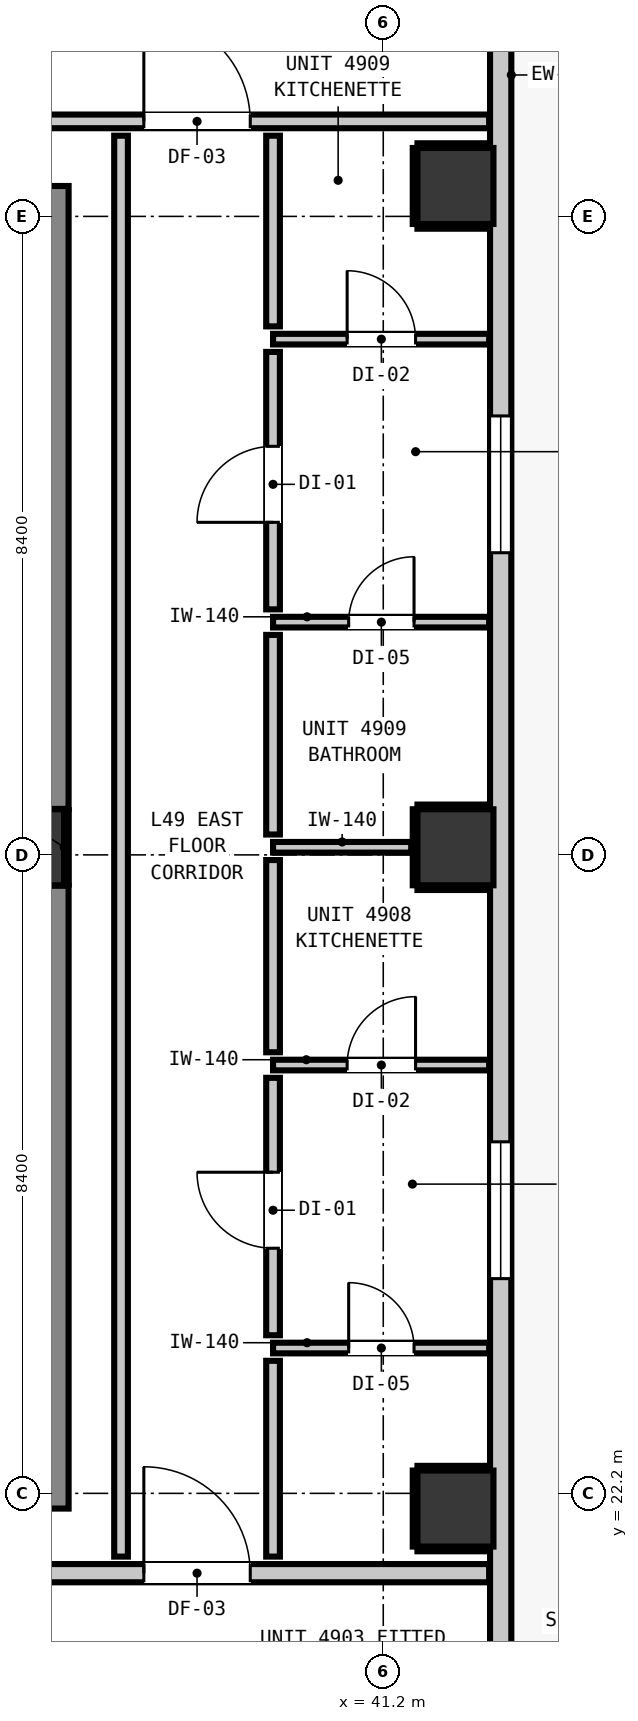
"""IFC4 building model, lengths in metres.
Left out: names, types, materials, properties, quantities, classifications, styles, units other than length and angle.
Written with IfcOpenShell. Run it as: python <this file> out.ifc"""

import sys

from ifc_helpers import new_model, si_unit, direction, frame, frame_2d, origin, origin_2d, place, context, subcontext, project, spatial, rectangle, extrude, element, fill, save


model = new_model("IFC4")
c1 = context("Model", 3, precision=1e-05, world=origin(), true_north=direction((0.0, 1.0)))
c2 = subcontext(c1, "Body", "Model", "MODEL_VIEW")
j1 = project(units=[si_unit("LENGTHUNIT", "METRE"), si_unit("PLANEANGLEUNIT", "RADIAN")], contexts=[c1])
p1 = place(None, origin())
s1 = spatial("IfcSite", under=j1, at=p1, CompositionType="ELEMENT")
p2 = place(p1, origin())
s2 = spatial("IfcBuilding", under=s1, at=p2, CompositionType="ELEMENT")
p3 = place(p2, frame((0.0, 0.0, 169.16)))
s3 = spatial("IfcBuildingStorey", under=s2, at=p3, CompositionType="ELEMENT", Elevation=169.16)
p4 = place(p3, frame((36.5, 30.7, 0.0), z_axis=(0.0, 0.0, 1.0), x_axis=(1.0, 0.0, 0.0)))
e1 = element("IfcColumn", 1, at=p4, inside=s3, PredefinedType="COLUMN", context=c2, shape_type="SweptSolid", body=[
    extrude(rectangle(XDim=1.0, YDim=1.0, at=origin_2d()), origin(), (0.0, 0.0, 1.0), 3.32),
])
p5 = place(p3, frame((36.56, 22.0, 0.0), z_axis=(0.0, 0.0, 1.0), x_axis=(0.0, 1.0, 0.0)))
e2 = element("IfcWall", 2, at=p5, inside=s3, PredefinedType="SHEAR", context=c2, shape_type="SweptSolid", body=[
    extrude(rectangle(XDim=8.195, YDim=1.0, at=frame_2d((4.098, 0.0))), origin(), (0.0, 0.0, 1.0), 3.32),
])
p6 = place(p3, frame((36.56, 31.205, 0.0), z_axis=(0.0, 0.0, 1.0), x_axis=(0.0, 1.0, 0.0)))
e3 = element("IfcWall", 3, at=p6, inside=s3, PredefinedType="SHEAR", context=c2, shape_type="SweptSolid", body=[
    extrude(rectangle(XDim=8.195, YDim=1.0, at=frame_2d((4.097, 0.0))), origin(), (0.0, 0.0, 1.0), 3.32),
])
for number, where, z_axis, x_axis in (
    (4, (42.15, 22.0, 0.0), (0.0, 0.0, 1.0), (1.0, 0.0, 0.0)),
    (5, (42.15, 30.7, 0.0), (0.0, 0.0, 1.0), (1.0, 0.0, 0.0)),
    (6, (42.15, 39.4, 0.0), (0.0, 0.0, 1.0), (1.0, 0.0, 0.0)),
):
    element("IfcColumn", number, at=place(p3, frame(where, z_axis=z_axis, x_axis=x_axis)), inside=s3, PredefinedType="COLUMN", context=c2, shape_type="SweptSolid", body=[
        extrude(rectangle(XDim=1.0, YDim=1.0, at=origin_2d()), origin(), (0.0, 0.0, 1.0), 3.32),
    ])
p7 = place(p3, frame((42.745, 49.845, 0.0), z_axis=(0.0, 0.0, 1.0), x_axis=(0.0, -1.0, 0.0)))
e7 = element("IfcWall", 7, at=p7, inside=s3, PredefinedType="STANDARD", context=c2, shape_type="SweptSolid", body=[
    extrude(rectangle(XDim=32.29, YDim=0.28, at=frame_2d((16.145, 0.0))), origin(), (0.0, 0.0, 1.0), 2.96),
])
p8 = place(p7, frame((0.904, 0.0, 0.0)))
e8 = element("IfcOpeningElement", 8, at=p8, cuts=e7, PredefinedType="OPENING", context=c2, shape_type="SweptSolid", body=[
    extrude(rectangle(XDim=1.0, YDim=2.15, at=frame_2d((0.5, 1.075))), frame((0.0, 0.15, 0.0), z_axis=(0.0, -1.0, 0.0), x_axis=(1.0, 0.0, 0.0)), (0.0, 0.0, 1.0), 0.3),
])
p9 = place(p7, frame((2.699, 0.0, 0.85)))
e9 = element("IfcOpeningElement", 9, at=p9, cuts=e7, PredefinedType="OPENING", context=c2, shape_type="SweptSolid", body=[
    extrude(rectangle(XDim=1.8, YDim=1.9, at=frame_2d((0.9, 0.95))), frame((0.0, 0.15, 0.0), z_axis=(0.0, -1.0, 0.0), x_axis=(1.0, 0.0, 0.0)), (0.0, 0.0, 1.0), 0.3),
])
p10 = place(p7, frame((23.02, 0.0, 0.85)))
e10 = element("IfcOpeningElement", 10, at=p10, cuts=e7, PredefinedType="OPENING", context=c2, shape_type="SweptSolid", body=[
    extrude(rectangle(XDim=1.8, YDim=1.9, at=frame_2d((0.9, 0.95))), frame((0.0, 0.15, 0.0), z_axis=(0.0, -1.0, 0.0), x_axis=(1.0, 0.0, 0.0)), (0.0, 0.0, 1.0), 0.3),
])
p11 = place(p7, frame((13.47, 0.0, 0.85)))
e11 = element("IfcOpeningElement", 11, at=p11, cuts=e7, PredefinedType="OPENING", context=c2, shape_type="SweptSolid", body=[
    extrude(rectangle(XDim=1.8, YDim=1.9, at=frame_2d((0.9, 0.95))), frame((0.0, 0.15, 0.0), z_axis=(0.0, -1.0, 0.0), x_axis=(1.0, 0.0, 0.0)), (0.0, 0.0, 1.0), 0.3),
])
p12 = place(p3, frame((12.983, 21.15, 0.0), z_axis=(0.0, 0.0, 1.0), x_axis=(1.0, 0.0, 0.0)))
e12 = element("IfcWall", 12, at=p12, inside=s3, PredefinedType="PARTITIONING", context=c2, shape_type="SweptSolid", body=[
    extrude(rectangle(XDim=29.61, YDim=0.24, at=frame_2d((14.805, 0.0))), origin(), (0.0, 0.0, 1.0), 2.96),
])
p13 = place(p12, frame((5.227, 0.0, 0.0)))
e13 = element("IfcOpeningElement", 13, at=p13, cuts=e12, PredefinedType="OPENING", context=c2, shape_type="SweptSolid", body=[
    extrude(rectangle(XDim=1.1, YDim=2.15, at=frame_2d((0.55, 1.075))), frame((0.0, 0.13, 0.0), z_axis=(0.0, -1.0, 0.0), x_axis=(1.0, 0.0, 0.0)), (0.0, 0.0, 1.0), 0.26),
])
p14 = place(p12, frame((25.067, 0.0, 0.0)))
e14 = element("IfcOpeningElement", 14, at=p14, cuts=e12, PredefinedType="OPENING", context=c2, shape_type="SweptSolid", body=[
    extrude(rectangle(XDim=1.4, YDim=2.15, at=frame_2d((0.7, 1.075))), frame((0.0, 0.13, 0.0), z_axis=(0.0, -1.0, 0.0), x_axis=(1.0, 0.0, 0.0)), (0.0, 0.0, 1.0), 0.26),
])
p15 = place(p3, frame((3.207, 40.25, 0.0), z_axis=(0.0, 0.0, 1.0), x_axis=(1.0, 0.0, 0.0)))
e15 = element("IfcWall", 15, at=p15, inside=s3, PredefinedType="PARTITIONING", context=c2, shape_type="SweptSolid", body=[
    extrude(rectangle(XDim=39.386, YDim=0.18, at=frame_2d((19.693, 0.0))), origin(), (0.0, 0.0, 1.0), 2.96),
])
p16 = place(p15, frame((14.228, 0.0, 0.0)))
e16 = element("IfcOpeningElement", 16, at=p16, cuts=e15, PredefinedType="OPENING", context=c2, shape_type="SweptSolid", body=[
    extrude(rectangle(XDim=1.4, YDim=2.15, at=frame_2d((0.7, 1.075))), frame((0.0, 0.1, 0.0), z_axis=(0.0, -1.0, 0.0), x_axis=(1.0, 0.0, 0.0)), (0.0, 0.0, 1.0), 0.2),
])
p17 = place(p15, frame((7.243, 0.0, 0.0)))
e17 = element("IfcOpeningElement", 17, at=p17, cuts=e15, PredefinedType="OPENING", context=c2, shape_type="SweptSolid", body=[
    extrude(rectangle(XDim=1.4, YDim=2.15, at=frame_2d((0.7, 1.075))), frame((0.0, 0.1, 0.0), z_axis=(0.0, -1.0, 0.0), x_axis=(1.0, 0.0, 0.0)), (0.0, 0.0, 1.0), 0.2),
])
p18 = place(p15, frame((34.843, 0.0, 0.0)))
e18 = element("IfcOpeningElement", 18, at=p18, cuts=e15, PredefinedType="OPENING", context=c2, shape_type="SweptSolid", body=[
    extrude(rectangle(XDim=1.4, YDim=2.15, at=frame_2d((0.7, 1.075))), frame((0.0, 0.1, 0.0), z_axis=(0.0, -1.0, 0.0), x_axis=(1.0, 0.0, 0.0)), (0.0, 0.0, 1.0), 0.2),
])
p19 = place(p3, frame((39.75, 24.112, 0.0), z_axis=(0.0, 0.0, 1.0), x_axis=(1.0, 0.0, 0.0)))
e19 = element("IfcWall", 19, at=p19, inside=s3, PredefinedType="PARTITIONING", context=c2, shape_type="SweptSolid", body=[
    extrude(rectangle(XDim=2.843, YDim=0.14, at=frame_2d((1.421, 0.0))), origin(), (0.0, 0.0, 1.0), 2.96),
])
p20 = place(p19, frame((0.995, 0.0, 0.0)))
e20 = element("IfcOpeningElement", 20, at=p20, cuts=e19, PredefinedType="OPENING", context=c2, shape_type="SweptSolid", body=[
    extrude(rectangle(XDim=0.86, YDim=2.02, at=frame_2d((0.43, 1.01))), frame((0.0, 0.08, 0.0), z_axis=(0.0, -1.0, 0.0), x_axis=(1.0, 0.0, 0.0)), (0.0, 0.0, 1.0), 0.16),
])
p21 = place(p3, frame((39.75, 27.835, 0.0), z_axis=(0.0, 0.0, 1.0), x_axis=(1.0, 0.0, 0.0)))
e21 = element("IfcWall", 21, at=p21, inside=s3, PredefinedType="PARTITIONING", context=c2, shape_type="SweptSolid", body=[
    extrude(rectangle(XDim=2.843, YDim=0.14, at=frame_2d((1.421, 0.0))), origin(), (0.0, 0.0, 1.0), 2.96),
])
p22 = place(p21, frame((0.975, 0.0, 0.0)))
e22 = element("IfcOpeningElement", 22, at=p22, cuts=e21, PredefinedType="OPENING", context=c2, shape_type="SweptSolid", body=[
    extrude(rectangle(XDim=0.9, YDim=2.1, at=frame_2d((0.45, 1.05))), frame((0.0, 0.08, 0.0), z_axis=(0.0, -1.0, 0.0), x_axis=(1.0, 0.0, 0.0)), (0.0, 0.0, 1.0), 0.16),
])
p23 = place(p3, frame((39.75, 30.7, 0.0), z_axis=(0.0, 0.0, 1.0), x_axis=(1.0, 0.0, 0.0)))
e23 = element("IfcWall", 23, at=p23, inside=s3, PredefinedType="PARTITIONING", context=c2, shape_type="SweptSolid", body=[
    extrude(rectangle(XDim=1.818, YDim=0.14, at=frame_2d((0.909, 0.0))), origin(), (0.0, 0.0, 1.0), 2.195),
])
p24 = place(p3, frame((39.75, 33.662, 0.0), z_axis=(0.0, 0.0, 1.0), x_axis=(1.0, 0.0, 0.0)))
e24 = element("IfcWall", 24, at=p24, inside=s3, PredefinedType="PARTITIONING", context=c2, shape_type="SweptSolid", body=[
    extrude(rectangle(XDim=2.843, YDim=0.14, at=frame_2d((1.421, 0.0))), origin(), (0.0, 0.0, 1.0), 2.96),
])
p25 = place(p24, frame((0.995, 0.0, 0.0)))
e25 = element("IfcOpeningElement", 25, at=p25, cuts=e24, PredefinedType="OPENING", context=c2, shape_type="SweptSolid", body=[
    extrude(rectangle(XDim=0.86, YDim=2.02, at=frame_2d((0.43, 1.01))), frame((0.0, 0.08, 0.0), z_axis=(0.0, -1.0, 0.0), x_axis=(1.0, 0.0, 0.0)), (0.0, 0.0, 1.0), 0.16),
])
p26 = place(p3, frame((39.75, 37.385, 0.0), z_axis=(0.0, 0.0, 1.0), x_axis=(1.0, 0.0, 0.0)))
e26 = element("IfcWall", 26, at=p26, inside=s3, PredefinedType="PARTITIONING", context=c2, shape_type="SweptSolid", body=[
    extrude(rectangle(XDim=2.843, YDim=0.14, at=frame_2d((1.421, 0.0))), origin(), (0.0, 0.0, 1.0), 2.96),
])
p27 = place(p26, frame((0.975, 0.0, 0.0)))
e27 = element("IfcOpeningElement", 27, at=p27, cuts=e26, PredefinedType="OPENING", context=c2, shape_type="SweptSolid", body=[
    extrude(rectangle(XDim=0.9, YDim=2.1, at=frame_2d((0.45, 1.05))), frame((0.0, 0.08, 0.0), z_axis=(0.0, -1.0, 0.0), x_axis=(1.0, 0.0, 0.0)), (0.0, 0.0, 1.0), 0.16),
])
p28 = place(p3, frame((37.75, 21.368, 0.0), z_axis=(0.0, 0.0, 1.0), x_axis=(0.0, 1.0, 0.0)))
e28 = element("IfcWall", 28, at=p28, inside=s3, PredefinedType="PARTITIONING", context=c2, shape_type="SweptSolid", body=[
    extrude(rectangle(XDim=18.694, YDim=0.18, at=frame_2d((9.347, 0.0))), origin(), (0.0, 0.0, 1.0), 2.96),
])
p29 = place(p3, frame((39.75, 21.368, 0.0), z_axis=(0.0, 0.0, 1.0), x_axis=(0.0, 1.0, 0.0)))
e29 = element("IfcWall", 29, at=p29, inside=s3, PredefinedType="PARTITIONING", context=c2, shape_type="SweptSolid", body=[
    extrude(rectangle(XDim=2.576, YDim=0.18, at=frame_2d((1.288, 0.0))), origin(), (0.0, 0.0, 1.0), 2.96),
])
p30 = place(p3, frame((39.75, 24.28, 0.0), z_axis=(0.0, 0.0, 1.0), x_axis=(0.0, 1.0, 0.0)))
e30 = element("IfcWall", 30, at=p30, inside=s3, PredefinedType="PARTITIONING", context=c2, shape_type="SweptSolid", body=[
    extrude(rectangle(XDim=3.387, YDim=0.18, at=frame_2d((1.693, 0.0))), origin(), (0.0, 0.0, 1.0), 2.96),
])
p31 = place(p30, frame((1.145, 0.0, 0.0)))
e31 = element("IfcOpeningElement", 31, at=p31, cuts=e30, PredefinedType="OPENING", context=c2, shape_type="SweptSolid", body=[
    extrude(rectangle(XDim=1.0, YDim=2.15, at=frame_2d((0.5, 1.075))), frame((0.0, 0.1, 0.0), z_axis=(0.0, -1.0, 0.0), x_axis=(1.0, 0.0, 0.0)), (0.0, 0.0, 1.0), 0.2),
])
p32 = place(p3, frame((39.75, 28.003, 0.0), z_axis=(0.0, 0.0, 1.0), x_axis=(0.0, 1.0, 0.0)))
e32 = element("IfcWall", 32, at=p32, inside=s3, PredefinedType="PARTITIONING", context=c2, shape_type="SweptSolid", body=[
    extrude(rectangle(XDim=2.529, YDim=0.18, at=frame_2d((1.265, 0.0))), origin(), (0.0, 0.0, 1.0), 2.96),
])
p33 = place(p3, frame((39.75, 30.868, 0.0), z_axis=(0.0, 0.0, 1.0), x_axis=(0.0, 1.0, 0.0)))
e33 = element("IfcWall", 33, at=p33, inside=s3, PredefinedType="PARTITIONING", context=c2, shape_type="SweptSolid", body=[
    extrude(rectangle(XDim=2.626, YDim=0.18, at=frame_2d((1.313, 0.0))), origin(), (0.0, 0.0, 1.0), 2.96),
])
p34 = place(p3, frame((39.75, 33.83, 0.0), z_axis=(0.0, 0.0, 1.0), x_axis=(0.0, 1.0, 0.0)))
e34 = element("IfcWall", 34, at=p34, inside=s3, PredefinedType="PARTITIONING", context=c2, shape_type="SweptSolid", body=[
    extrude(rectangle(XDim=3.387, YDim=0.18, at=frame_2d((1.693, 0.0))), origin(), (0.0, 0.0, 1.0), 2.96),
])
p35 = place(p34, frame((1.145, 0.0, 0.0)))
e35 = element("IfcOpeningElement", 35, at=p35, cuts=e34, PredefinedType="OPENING", context=c2, shape_type="SweptSolid", body=[
    extrude(rectangle(XDim=1.0, YDim=2.15, at=frame_2d((0.5, 1.075))), frame((0.0, 0.1, 0.0), z_axis=(0.0, -1.0, 0.0), x_axis=(1.0, 0.0, 0.0)), (0.0, 0.0, 1.0), 0.2),
])
p36 = place(p3, frame((39.75, 37.553, 0.0), z_axis=(0.0, 0.0, 1.0), x_axis=(0.0, 1.0, 0.0)))
e36 = element("IfcWall", 36, at=p36, inside=s3, PredefinedType="PARTITIONING", context=c2, shape_type="SweptSolid", body=[
    extrude(rectangle(XDim=2.509, YDim=0.18, at=frame_2d((1.254, 0.0))), origin(), (0.0, 0.0, 1.0), 2.96),
])
p37 = place(p3, frame((37.032, 30.21, 0.0), z_axis=(0.0, 0.0, 1.0), x_axis=(0.0, 1.0, 0.0)))
e37 = element("IfcWall", 37, at=p37, inside=s3, PredefinedType="PARTITIONING", context=c2, shape_type="SweptSolid", body=[
    extrude(rectangle(XDim=0.98, YDim=0.06, at=frame_2d((0.49, 0.0))), origin(), (0.0, 0.0, 1.0), 1.45),
])
for number, where, z_axis, x_axis in (
    (38, (41.65, 21.468, 0.0), (0.0, 0.0, 1.0), (1.0, 0.0, 0.0)),
    (39, (41.65, 22.532, 0.0), (0.0, 0.0, 1.0), (1.0, 0.0, 0.0)),
):
    element("IfcWall", number, at=place(p3, frame(where, z_axis=z_axis, x_axis=x_axis)), inside=s3, PredefinedType="PARTITIONING", context=c2, shape_type="SweptSolid", body=[
        extrude(rectangle(XDim=0.94, YDim=0.06, at=frame_2d((0.47, 0.0))), origin(), (0.0, 0.0, 1.0), 1.45),
    ])
p38 = place(p3, frame((41.618, 21.5, 0.0), z_axis=(0.0, 0.0, 1.0), x_axis=(0.0, 1.0, 0.0)))
e40 = element("IfcWall", 40, at=p38, inside=s3, PredefinedType="PARTITIONING", context=c2, shape_type="SweptSolid", body=[
    extrude(rectangle(XDim=1.0, YDim=0.06, at=frame_2d((0.5, 0.0))), origin(), (0.0, 0.0, 1.0), 1.45),
])
for number, where, z_axis, x_axis in (
    (41, (41.65, 30.168, 0.0), (0.0, 0.0, 1.0), (1.0, 0.0, 0.0)),
    (42, (41.65, 31.232, 0.0), (0.0, 0.0, 1.0), (1.0, 0.0, 0.0)),
):
    element("IfcWall", number, at=place(p3, frame(where, z_axis=z_axis, x_axis=x_axis)), inside=s3, PredefinedType="PARTITIONING", context=c2, shape_type="SweptSolid", body=[
        extrude(rectangle(XDim=0.94, YDim=0.06, at=frame_2d((0.47, 0.0))), origin(), (0.0, 0.0, 1.0), 1.45),
    ])
p39 = place(p3, frame((41.618, 30.2, 0.0), z_axis=(0.0, 0.0, 1.0), x_axis=(0.0, 1.0, 0.0)))
e43 = element("IfcWall", 43, at=p39, inside=s3, PredefinedType="PARTITIONING", context=c2, shape_type="SweptSolid", body=[
    extrude(rectangle(XDim=1.0, YDim=0.06, at=frame_2d((0.5, 0.0))), origin(), (0.0, 0.0, 1.0), 1.45),
])
for number, where, z_axis, x_axis in (
    (44, (41.65, 38.868, 0.0), (0.0, 0.0, 1.0), (1.0, 0.0, 0.0)),
    (45, (41.65, 39.932, 0.0), (0.0, 0.0, 1.0), (1.0, 0.0, 0.0)),
):
    element("IfcWall", number, at=place(p3, frame(where, z_axis=z_axis, x_axis=x_axis)), inside=s3, PredefinedType="PARTITIONING", context=c2, shape_type="SweptSolid", body=[
        extrude(rectangle(XDim=0.94, YDim=0.06, at=frame_2d((0.47, 0.0))), origin(), (0.0, 0.0, 1.0), 1.45),
    ])
p40 = place(p3, frame((41.618, 38.9, 0.0), z_axis=(0.0, 0.0, 1.0), x_axis=(0.0, 1.0, 0.0)))
e46 = element("IfcWall", 46, at=p40, inside=s3, PredefinedType="PARTITIONING", context=c2, shape_type="SweptSolid", body=[
    extrude(rectangle(XDim=1.0, YDim=0.06, at=frame_2d((0.5, 0.0))), origin(), (0.0, 0.0, 1.0), 1.45),
])
p41 = place(p10, origin())
e47 = element("IfcWindow", 47, at=p41, inside=s3, PartitioningType="SINGLE_PANEL", PredefinedType="WINDOW", context=c2, shape_type="SweptSolid", body=[
    extrude(rectangle(XDim=1.8, YDim=1.9, at=frame_2d((0.9, 0.95))), frame((0.0, 0.03, 0.0), z_axis=(0.0, -1.0, 0.0), x_axis=(1.0, 0.0, 0.0)), (0.0, 0.0, 1.0), 0.06),
])
fill(e10, e47)
p42 = place(p11, origin())
e48 = element("IfcWindow", 48, at=p42, inside=s3, PartitioningType="SINGLE_PANEL", PredefinedType="WINDOW", context=c2, shape_type="SweptSolid", body=[
    extrude(rectangle(XDim=1.8, YDim=1.9, at=frame_2d((0.9, 0.95))), frame((0.0, 0.03, 0.0), z_axis=(0.0, -1.0, 0.0), x_axis=(1.0, 0.0, 0.0)), (0.0, 0.0, 1.0), 0.06),
])
fill(e11, e48)
p43 = place(p14, origin())
e49 = element("IfcDoor", 49, at=p43, inside=s3, OperationType="SINGLE_SWING_LEFT", PredefinedType="DOOR", context=c2, shape_type="SweptSolid", body=[
    extrude(rectangle(XDim=1.4, YDim=2.15, at=frame_2d((0.7, 1.075))), frame((0.0, 0.025, 0.0), z_axis=(0.0, -1.0, 0.0), x_axis=(1.0, 0.0, 0.0)), (0.0, 0.0, 1.0), 0.05),
])
fill(e14, e49)
p44 = place(p18, origin())
e50 = element("IfcDoor", 50, at=p44, inside=s3, OperationType="SINGLE_SWING_LEFT", PredefinedType="DOOR", context=c2, shape_type="SweptSolid", body=[
    extrude(rectangle(XDim=1.4, YDim=2.15, at=frame_2d((0.7, 1.075))), frame((0.0, 0.025, 0.0), z_axis=(0.0, -1.0, 0.0), x_axis=(1.0, 0.0, 0.0)), (0.0, 0.0, 1.0), 0.05),
])
fill(e18, e50)
p45 = place(p31, origin())
e51 = element("IfcDoor", 51, at=p45, inside=s3, OperationType="SINGLE_SWING_RIGHT", PredefinedType="DOOR", context=c2, shape_type="SweptSolid", body=[
    extrude(rectangle(XDim=1.0, YDim=2.15, at=frame_2d((0.5, 1.075))), frame((0.0, 0.025, 0.0), z_axis=(0.0, -1.0, 0.0), x_axis=(1.0, 0.0, 0.0)), (0.0, 0.0, 1.0), 0.05),
])
fill(e31, e51)
p46 = place(p20, origin())
e52 = element("IfcDoor", 52, at=p46, inside=s3, OperationType="SINGLE_SWING_LEFT", PredefinedType="DOOR", context=c2, shape_type="SweptSolid", body=[
    extrude(rectangle(XDim=0.86, YDim=2.02, at=frame_2d((0.43, 1.01))), frame((0.0, 0.025, 0.0), z_axis=(0.0, -1.0, 0.0), x_axis=(1.0, 0.0, 0.0)), (0.0, 0.0, 1.0), 0.05),
])
fill(e20, e52)
p47 = place(p22, origin())
e53 = element("IfcDoor", 53, at=p47, inside=s3, OperationType="SINGLE_SWING_RIGHT", PredefinedType="DOOR", context=c2, shape_type="SweptSolid", body=[
    extrude(rectangle(XDim=0.9, YDim=2.1, at=frame_2d((0.45, 1.05))), frame((0.0, 0.025, 0.0), z_axis=(0.0, -1.0, 0.0), x_axis=(1.0, 0.0, 0.0)), (0.0, 0.0, 1.0), 0.05),
])
fill(e22, e53)
p48 = place(p35, origin())
e54 = element("IfcDoor", 54, at=p48, inside=s3, OperationType="SINGLE_SWING_LEFT", PredefinedType="DOOR", context=c2, shape_type="SweptSolid", body=[
    extrude(rectangle(XDim=1.0, YDim=2.15, at=frame_2d((0.5, 1.075))), frame((0.0, 0.025, 0.0), z_axis=(0.0, -1.0, 0.0), x_axis=(1.0, 0.0, 0.0)), (0.0, 0.0, 1.0), 0.05),
])
fill(e35, e54)
p49 = place(p25, origin())
e55 = element("IfcDoor", 55, at=p49, inside=s3, OperationType="SINGLE_SWING_RIGHT", PredefinedType="DOOR", context=c2, shape_type="SweptSolid", body=[
    extrude(rectangle(XDim=0.86, YDim=2.02, at=frame_2d((0.43, 1.01))), frame((0.0, 0.025, 0.0), z_axis=(0.0, -1.0, 0.0), x_axis=(1.0, 0.0, 0.0)), (0.0, 0.0, 1.0), 0.05),
])
fill(e25, e55)
p50 = place(p27, origin())
e56 = element("IfcDoor", 56, at=p50, inside=s3, OperationType="SINGLE_SWING_LEFT", PredefinedType="DOOR", context=c2, shape_type="SweptSolid", body=[
    extrude(rectangle(XDim=0.9, YDim=2.1, at=frame_2d((0.45, 1.05))), frame((0.0, 0.025, 0.0), z_axis=(0.0, -1.0, 0.0), x_axis=(1.0, 0.0, 0.0)), (0.0, 0.0, 1.0), 0.05),
])
fill(e27, e56)
save(model, sys.argv[1])
